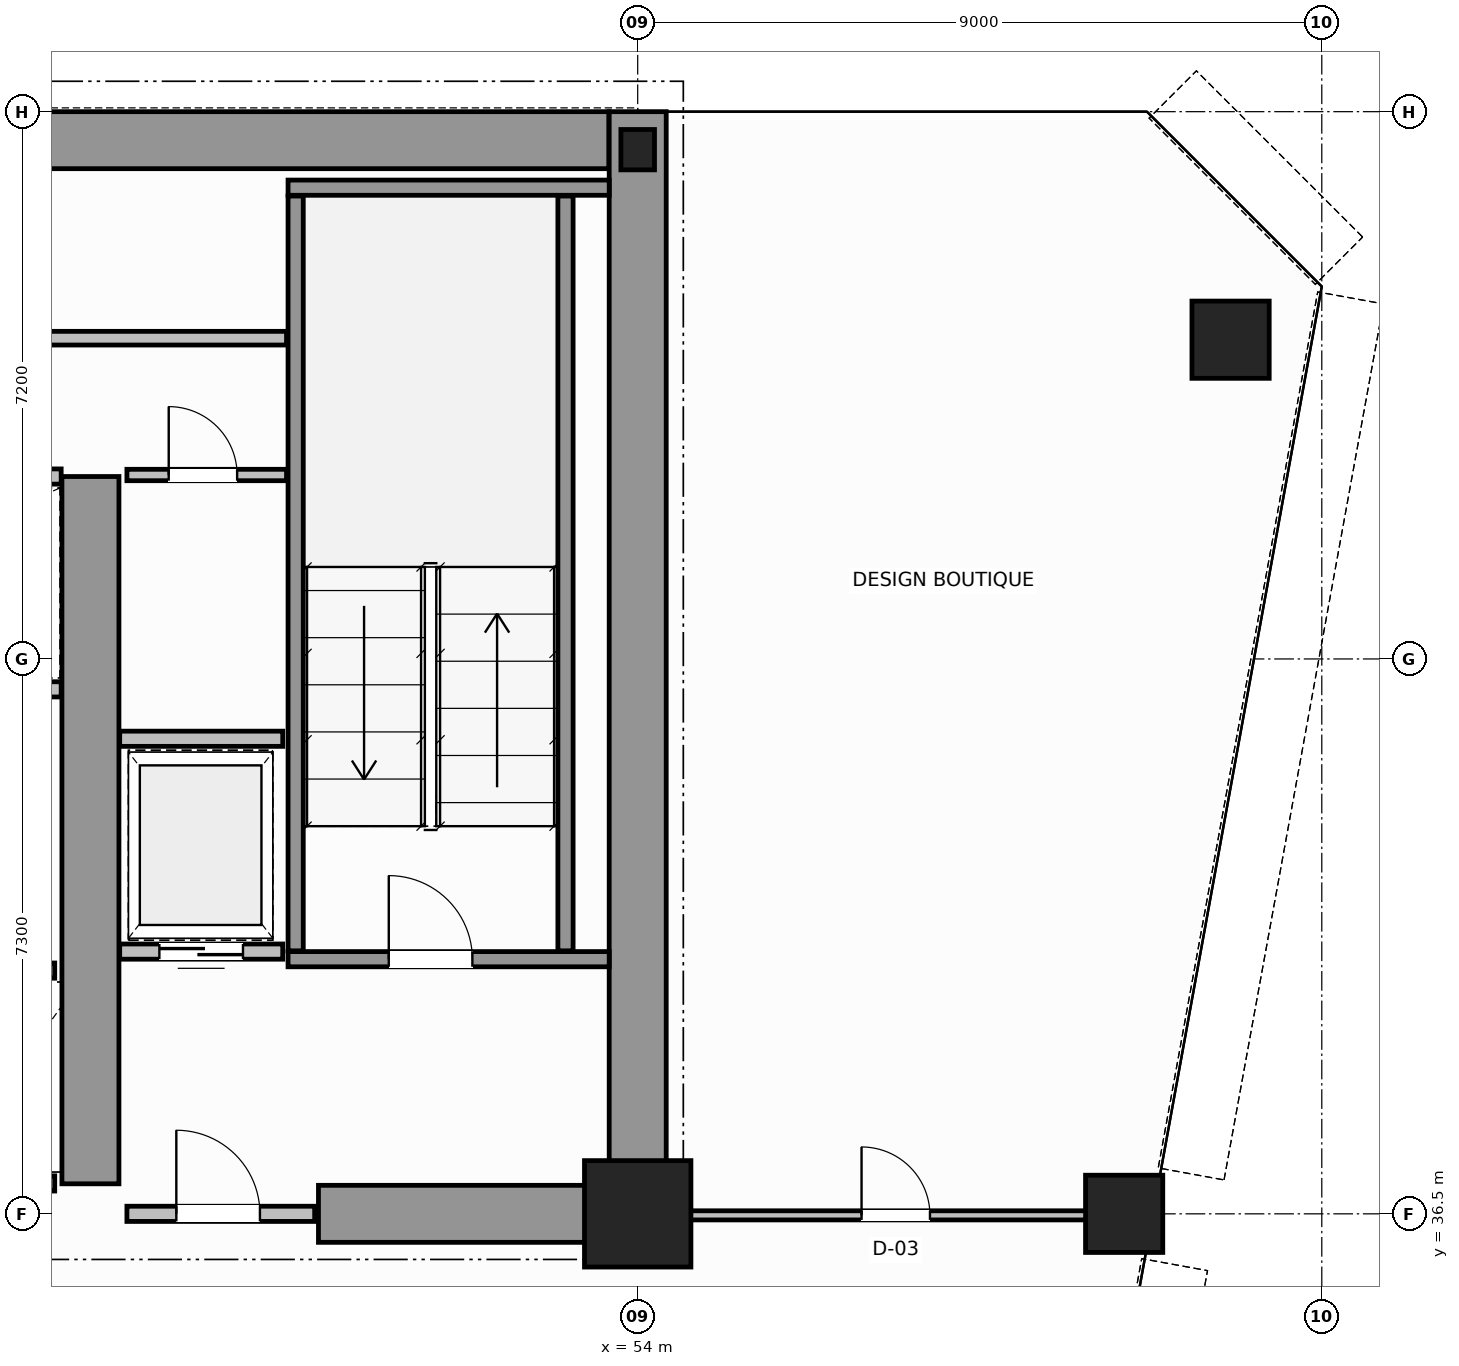
"""IFC4 building model, lengths in metres.
Left out: names, types, materials, properties, quantities, classifications, styles, units other than length and angle.
Written with IfcOpenShell. Run it as: python <this file> out.ifc"""

import sys

from ifc_helpers import new_model, si_unit, direction, frame, frame_2d, origin, origin_2d, place, context, subcontext, project, spatial, rectangle, hollow_circle, i_section, extrude, source, transform, mapped, element, fill, save


model = new_model("IFC4")
c1 = context("Model", 3, precision=1e-05, world=origin(), true_north=direction((0.0, 1.0)))
c2 = subcontext(c1, "Body", "Model", "MODEL_VIEW")
j1 = project(units=[si_unit("LENGTHUNIT", "METRE"), si_unit("PLANEANGLEUNIT", "RADIAN")], contexts=[c1])
p1 = place(None, origin())
s1 = spatial("IfcSite", under=j1, at=p1, CompositionType="ELEMENT")
p2 = place(p1, origin())
s2 = spatial("IfcBuilding", under=s1, at=p2, CompositionType="ELEMENT")
p3 = place(p2, frame((0.0, 0.0, 114.8)))
s3 = spatial("IfcBuildingStorey", under=s2, at=p3, CompositionType="ELEMENT", Elevation=114.8)
m1 = source(origin(), c2, "Body", "SweptSolid", [
    extrude(rectangle(XDim=1.4, YDim=1.4, at=origin_2d()), origin(), (0.0, 0.0, 1.0), 3.8),
])
p4 = place(p3, frame((54.0, 36.5, 0.0), z_axis=(0.0, 0.0, 1.0), x_axis=(1.0, 0.0, 0.0)))
e1 = element("IfcColumn", 1, at=p4, inside=s3, PredefinedType="COLUMN", context=c2, shape_type="MappedRepresentation", body=[
    mapped(m1, transform((0.0, 0.0, 0.0), scale=1.0)),
])
m2 = source(origin(), c2, "Body", "SweptSolid", [
    extrude(i_section(OverallWidth=0.442, OverallDepth=0.531, WebThickness=0.065, FlangeThickness=0.076, FilletRadius=0.015, at=origin_2d()), origin(), (0.0, 0.0, 1.0), 3.8),
])
p5 = place(p3, frame((54.0, 50.5, 0.0), z_axis=(0.0, 0.0, 1.0), x_axis=(1.0, 0.0, 0.0)))
e2 = element("IfcColumn", 2, at=p5, inside=s3, PredefinedType="COLUMN", context=c2, shape_type="MappedRepresentation", body=[
    mapped(m2, transform((0.0, 0.0, 0.0), scale=1.0)),
])
m3 = source(origin(), c2, "Body", "SweptSolid", [
    extrude(hollow_circle(Radius=0.508, WallThickness=0.045, at=origin_2d()), origin(), (0.0, 0.0, 1.0), 3.8),
])
for number, where, z_axis, x_axis in (
    (3, (61.8, 48.0, 0.0), (0.0, 0.0, 1.0), (1.0, 0.0, 0.0)),
    (4, (60.4, 36.5, 0.0), (0.0, 0.0, 1.0), (1.0, 0.0, 0.0)),
):
    element("IfcColumn", number, at=place(p3, frame(where, z_axis=z_axis, x_axis=x_axis)), inside=s3, PredefinedType="COLUMN", context=c2, shape_type="MappedRepresentation", body=[
        mapped(m3, transform((0.0, 0.0, 0.0), scale=1.0)),
    ])
p6 = place(p3, frame((34.002, 50.625, 0.0), z_axis=(0.0, 0.0, 1.0), x_axis=(1.0, 0.0, 0.0)))
e5 = element("IfcWall", 5, at=p6, inside=s3, PredefinedType="SHEAR", context=c2, shape_type="SweptSolid", body=[
    extrude(rectangle(XDim=19.619, YDim=0.75, at=frame_2d((9.81, 0.0))), origin(), (0.0, 0.0, 1.0), 3.8),
])
p7 = place(p3, frame((54.0, 36.5, 0.0), z_axis=(0.0, 0.0, 1.0), x_axis=(0.0, 1.0, 0.0)))
e6 = element("IfcWall", 6, at=p7, inside=s3, PredefinedType="SHEAR", context=c2, shape_type="SweptSolid", body=[
    extrude(rectangle(XDim=14.5, YDim=0.75, at=frame_2d((7.25, 0.0))), origin(), (0.0, 0.0, 1.0), 3.8),
])
p8 = place(p3, frame((49.8, 36.5, 0.0), z_axis=(0.0, 0.0, 1.0), x_axis=(1.0, 0.0, 0.0)))
e7 = element("IfcWall", 7, at=p8, inside=s3, PredefinedType="SHEAR", context=c2, shape_type="SweptSolid", body=[
    extrude(rectangle(XDim=3.805, YDim=0.75, at=frame_2d((1.902, 0.0))), origin(), (0.0, 0.0, 1.0), 2.38),
])
p9 = place(p3, frame((46.8, 36.895, 0.0), z_axis=(0.0, 0.0, 1.0), x_axis=(0.0, 1.0, 0.0)))
e8 = element("IfcWall", 8, at=p9, inside=s3, PredefinedType="SHEAR", context=c2, shape_type="SweptSolid", body=[
    extrude(rectangle(XDim=9.305, YDim=0.75, at=frame_2d((4.652, 0.0))), origin(), (0.0, 0.0, 1.0), 3.8),
])
p10 = place(p3, frame((49.4, 39.85, 0.0), z_axis=(0.0, 0.0, 1.0), x_axis=(1.0, 0.0, 0.0)))
e9 = element("IfcWall", 9, at=p10, inside=s3, PredefinedType="SOLIDWALL", context=c2, shape_type="SweptSolid", body=[
    extrude(rectangle(XDim=4.225, YDim=0.2, at=frame_2d((2.113, 0.0))), origin(), (0.0, 0.0, 1.0), 3.8),
])
p11 = place(p10, frame((1.325, 0.0, 0.0)))
e10 = element("IfcOpeningElement", 10, at=p11, cuts=e9, PredefinedType="OPENING", context=c2, shape_type="SweptSolid", body=[
    extrude(rectangle(XDim=1.1, YDim=2.15, at=frame_2d((0.55, 1.075))), frame((0.0, 0.11, 0.0), z_axis=(0.0, -1.0, 0.0), x_axis=(1.0, 0.0, 0.0)), (0.0, 0.0, 1.0), 0.22),
])
p12 = place(p3, frame((49.4, 50.0, 0.0), z_axis=(0.0, 0.0, 1.0), x_axis=(1.0, 0.0, 0.0)))
e11 = element("IfcWall", 11, at=p12, inside=s3, PredefinedType="SOLIDWALL", context=c2, shape_type="SweptSolid", body=[
    extrude(rectangle(XDim=4.225, YDim=0.2, at=frame_2d((2.113, 0.0))), origin(), (0.0, 0.0, 1.0), 3.8),
])
for number, where, z_axis, x_axis in (
    (12, (49.5, 39.96, 0.0), (0.0, 0.0, 1.0), (0.0, 1.0, 0.0)),
    (13, (53.05, 39.96, 0.0), (0.0, 0.0, 1.0), (0.0, 1.0, 0.0)),
):
    element("IfcWall", number, at=place(p3, frame(where, z_axis=z_axis, x_axis=x_axis)), inside=s3, PredefinedType="SOLIDWALL", context=c2, shape_type="SweptSolid", body=[
        extrude(rectangle(XDim=9.93, YDim=0.2, at=frame_2d((4.965, 0.0))), origin(), (0.0, 0.0, 1.0), 3.8),
    ])
p13 = place(p3, frame((47.28, 36.5, 0.0), z_axis=(0.0, 0.0, 1.0), x_axis=(1.0, 0.0, 0.0)))
e14 = element("IfcWall", 14, at=p13, inside=s3, PredefinedType="SOLIDWALL", context=c2, shape_type="SweptSolid", body=[
    extrude(rectangle(XDim=2.47, YDim=0.2, at=frame_2d((1.235, 0.0))), origin(), (0.0, 0.0, 1.0), 2.37),
])
p14 = place(p13, frame((0.65, 0.0, 0.0)))
e15 = element("IfcOpeningElement", 15, at=p14, cuts=e14, PredefinedType="OPENING", context=c2, shape_type="SweptSolid", body=[
    extrude(rectangle(XDim=1.1, YDim=2.15, at=frame_2d((0.55, 1.075))), frame((0.0, 0.11, 0.0), z_axis=(0.0, -1.0, 0.0), x_axis=(1.0, 0.0, 0.0)), (0.0, 0.0, 1.0), 0.22),
])
p15 = place(p3, frame((44.37, 39.7, 0.0), z_axis=(0.0, 0.0, 1.0), x_axis=(1.0, 0.0, 0.0)))
e16 = element("IfcWall", 16, at=p15, inside=s3, PredefinedType="SOLIDWALL", context=c2, shape_type="SweptSolid", body=[
    extrude(rectangle(XDim=1.96, YDim=0.2, at=frame_2d((0.98, 0.0))), origin(), (0.0, 0.0, 1.0), 3.58),
])
p16 = place(p3, frame((44.37, 36.9, 0.0), z_axis=(0.0, 0.0, 1.0), x_axis=(1.0, 0.0, 0.0)))
e17 = element("IfcWall", 17, at=p16, inside=s3, PredefinedType="SOLIDWALL", context=c2, shape_type="SweptSolid", body=[
    extrude(rectangle(XDim=1.96, YDim=0.2, at=frame_2d((0.98, 0.0))), origin(), (0.0, 0.0, 1.0), 2.37),
])
for number, where, z_axis, x_axis in (
    (18, (44.62, 43.4, 0.0), (0.0, 0.0, 1.0), (1.0, 0.0, 0.0)),
    (19, (44.62, 46.2, 0.0), (0.0, 0.0, 1.0), (1.0, 0.0, 0.0)),
):
    element("IfcWall", number, at=place(p3, frame(where, z_axis=z_axis, x_axis=x_axis)), inside=s3, PredefinedType="SOLIDWALL", context=c2, shape_type="SweptSolid", body=[
        extrude(rectangle(XDim=1.795, YDim=0.2, at=frame_2d((0.897, 0.0))), origin(), (0.0, 0.0, 1.0), 3.58),
    ])
p17 = place(p3, frame((47.185, 39.95, 0.0), z_axis=(0.0, 0.0, 1.0), x_axis=(1.0, 0.0, 0.0)))
e20 = element("IfcWall", 20, at=p17, inside=s3, PredefinedType="SOLIDWALL", context=c2, shape_type="SweptSolid", body=[
    extrude(rectangle(XDim=2.145, YDim=0.2, at=frame_2d((1.073, 0.0))), origin(), (0.0, 0.0, 1.0), 3.58),
])
p18 = place(p17, frame((0.522, 0.0, 0.0)))
e21 = element("IfcOpeningElement", 21, at=p18, cuts=e20, PredefinedType="OPENING", context=c2, shape_type="SweptSolid", body=[
    extrude(rectangle(XDim=1.1, YDim=2.15, at=frame_2d((0.55, 1.075))), frame((0.0, 0.11, 0.0), z_axis=(0.0, -1.0, 0.0), x_axis=(1.0, 0.0, 0.0)), (0.0, 0.0, 1.0), 0.22),
])
p19 = place(p3, frame((47.185, 42.75, 0.0), z_axis=(0.0, 0.0, 1.0), x_axis=(1.0, 0.0, 0.0)))
e22 = element("IfcWall", 22, at=p19, inside=s3, PredefinedType="SOLIDWALL", context=c2, shape_type="SweptSolid", body=[
    extrude(rectangle(XDim=2.145, YDim=0.2, at=frame_2d((1.073, 0.0))), origin(), (0.0, 0.0, 1.0), 3.58),
])
p20 = place(p3, frame((47.28, 46.22, 0.0), z_axis=(0.0, 0.0, 1.0), x_axis=(1.0, 0.0, 0.0)))
e23 = element("IfcWall", 23, at=p20, inside=s3, PredefinedType="PARTITIONING", context=c2, shape_type="SweptSolid", body=[
    extrude(rectangle(XDim=2.1, YDim=0.15, at=frame_2d((1.05, 0.0))), origin(), (0.0, 0.0, 1.0), 3.58),
])
p21 = place(p20, frame((0.55, 0.0, 0.0)))
e24 = element("IfcOpeningElement", 24, at=p21, cuts=e23, PredefinedType="OPENING", context=c2, shape_type="SweptSolid", body=[
    extrude(rectangle(XDim=0.9, YDim=2.1, at=frame_2d((0.45, 1.05))), frame((0.0, 0.085, 0.0), z_axis=(0.0, -1.0, 0.0), x_axis=(1.0, 0.0, 0.0)), (0.0, 0.0, 1.0), 0.17),
])
p22 = place(p3, frame((18.62, 48.02, 0.0), z_axis=(0.0, 0.0, 1.0), x_axis=(1.0, 0.0, 0.0)))
e25 = element("IfcWall", 25, at=p22, inside=s3, PredefinedType="PLUMBINGWALL", context=c2, shape_type="SweptSolid", body=[
    extrude(rectangle(XDim=30.76, YDim=0.18, at=frame_2d((15.38, 0.0))), origin(), (0.0, 0.0, 1.0), 3.58),
])
p23 = place(p22, frame((1.955, 0.0, 0.0)))
e26 = element("IfcOpeningElement", 26, at=p23, cuts=e25, PredefinedType="OPENING", context=c2, shape_type="SweptSolid", body=[
    extrude(rectangle(XDim=0.9, YDim=2.15, at=frame_2d((0.45, 1.075))), frame((0.0, 0.1, 0.0), z_axis=(0.0, -1.0, 0.0), x_axis=(1.0, 0.0, 0.0)), (0.0, 0.0, 1.0), 0.2),
])
p24 = place(p22, frame((8.03, 0.0, 0.0)))
e27 = element("IfcOpeningElement", 27, at=p24, cuts=e25, PredefinedType="OPENING", context=c2, shape_type="SweptSolid", body=[
    extrude(rectangle(XDim=0.9, YDim=2.15, at=frame_2d((0.45, 1.075))), frame((0.0, 0.1, 0.0), z_axis=(0.0, -1.0, 0.0), x_axis=(1.0, 0.0, 0.0)), (0.0, 0.0, 1.0), 0.2),
])
p25 = place(p22, frame((16.93, 0.0, 0.0)))
e28 = element("IfcOpeningElement", 28, at=p25, cuts=e25, PredefinedType="OPENING", context=c2, shape_type="SweptSolid", body=[
    extrude(rectangle(XDim=0.9, YDim=2.15, at=frame_2d((0.45, 1.075))), frame((0.0, 0.1, 0.0), z_axis=(0.0, -1.0, 0.0), x_axis=(1.0, 0.0, 0.0)), (0.0, 0.0, 1.0), 0.2),
])
p26 = place(p22, frame((26.205, 0.0, 0.0)))
e29 = element("IfcOpeningElement", 29, at=p26, cuts=e25, PredefinedType="OPENING", context=c2, shape_type="SweptSolid", body=[
    extrude(rectangle(XDim=0.9, YDim=2.15, at=frame_2d((0.45, 1.075))), frame((0.0, 0.1, 0.0), z_axis=(0.0, -1.0, 0.0), x_axis=(1.0, 0.0, 0.0)), (0.0, 0.0, 1.0), 0.2),
])
p27 = place(p3, frame((54.06, 36.48, 0.0), z_axis=(0.0, 0.0, 1.0), x_axis=(1.0, 0.0, 0.0)))
e30 = element("IfcWall", 30, at=p27, inside=s3, PredefinedType="PARTITIONING", context=c2, shape_type="SweptSolid", body=[
    extrude(rectangle(XDim=6.67, YDim=0.12, at=frame_2d((3.335, 0.0))), origin(), (0.0, 0.0, 1.0), 2.87),
])
p28 = place(p27, frame((2.885, 0.0, 0.0)))
e31 = element("IfcOpeningElement", 31, at=p28, cuts=e30, PredefinedType="OPENING", context=c2, shape_type="SweptSolid", body=[
    extrude(rectangle(XDim=0.9, YDim=2.15, at=frame_2d((0.45, 1.075))), frame((0.0, 0.07, 0.0), z_axis=(0.0, -1.0, 0.0), x_axis=(1.0, 0.0, 0.0)), (0.0, 0.0, 1.0), 0.14),
])
m4 = source(origin(), c2, "Body", "SweptSolid", [
    extrude(rectangle(XDim=1.1, YDim=2.15, at=frame_2d((0.55, 1.075))), frame((0.0, 0.025, 0.0), z_axis=(0.0, -1.0, 0.0), x_axis=(1.0, 0.0, 0.0)), (0.0, 0.0, 1.0), 0.05),
])
p29 = place(p11, origin())
e32 = element("IfcDoor", 32, at=p29, inside=s3, OperationType="SINGLE_SWING_RIGHT", PredefinedType="DOOR", context=c2, shape_type="MappedRepresentation", body=[
    mapped(m4, transform((0.0, 0.0, 0.0), scale=1.0)),
])
fill(e10, e32)
p30 = place(p14, origin())
e33 = element("IfcDoor", 33, at=p30, inside=s3, OperationType="SINGLE_SWING_LEFT", PredefinedType="DOOR", context=c2, shape_type="MappedRepresentation", body=[
    mapped(m4, transform((0.0, 0.0, 0.0), scale=1.0)),
])
fill(e15, e33)
p31 = place(p18, origin())
e34 = element("IfcDoor", 34, at=p31, inside=s3, OperationType="DOUBLE_DOOR_SLIDING", PredefinedType="DOOR", context=c2, shape_type="MappedRepresentation", body=[
    mapped(m4, transform((0.0, 0.0, 0.0), scale=1.0)),
])
fill(e21, e34)
m5 = source(origin(), c2, "Body", "SweptSolid", [
    extrude(rectangle(XDim=0.9, YDim=2.1, at=frame_2d((0.45, 1.05))), frame((0.0, 0.025, 0.0), z_axis=(0.0, -1.0, 0.0), x_axis=(1.0, 0.0, 0.0)), (0.0, 0.0, 1.0), 0.05),
])
p32 = place(p21, origin())
e35 = element("IfcDoor", 35, at=p32, inside=s3, OperationType="SINGLE_SWING_RIGHT", PredefinedType="DOOR", context=c2, shape_type="MappedRepresentation", body=[
    mapped(m5, transform((0.0, 0.0, 0.0), scale=1.0)),
])
fill(e24, e35)
m6 = source(origin(), c2, "Body", "SweptSolid", [
    extrude(rectangle(XDim=0.9, YDim=2.15, at=frame_2d((0.45, 1.075))), frame((0.0, 0.025, 0.0), z_axis=(0.0, -1.0, 0.0), x_axis=(1.0, 0.0, 0.0)), (0.0, 0.0, 1.0), 0.05),
])
p33 = place(p28, origin())
e36 = element("IfcDoor", 36, at=p33, inside=s3, OperationType="SINGLE_SWING_RIGHT", PredefinedType="DOOR", context=c2, shape_type="MappedRepresentation", body=[
    mapped(m6, transform((0.0, 0.0, 0.0), scale=1.0)),
])
fill(e31, e36)
save(model, sys.argv[1])
